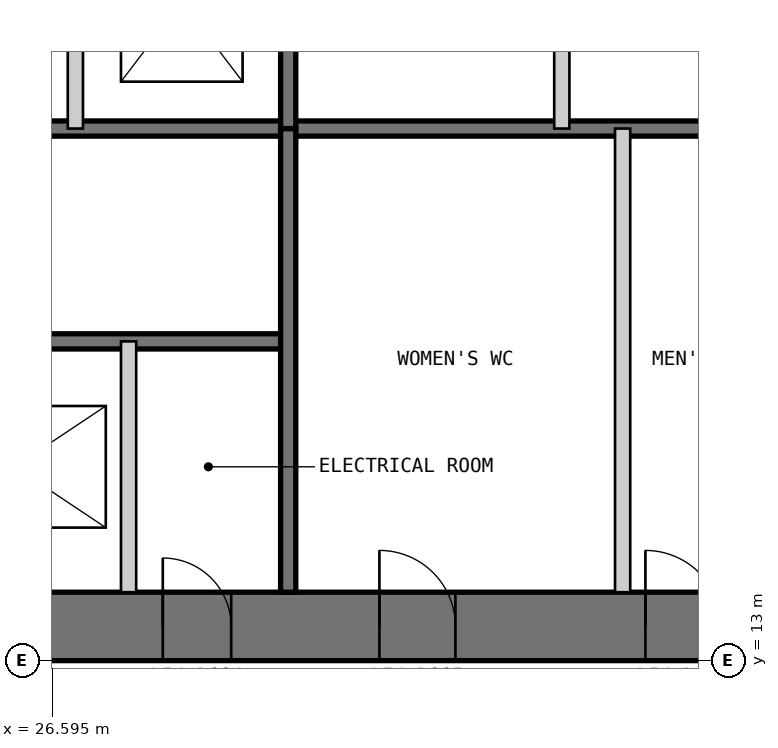
"""IFC4 building model, lengths in metres.
Left out: names, types, materials, properties, quantities, classifications, styles, units other than length and angle.
Written with IfcOpenShell. Run it as: python <this file> out.ifc"""

import sys

from ifc_helpers import new_model, si_unit, direction, frame, frame_2d, origin, place, context, subcontext, project, spatial, polyline, rectangle, outline, extrude, element, fill, save


model = new_model("IFC4")
c1 = context("Model", 3, precision=1e-05, world=origin(), true_north=direction((0.0, 1.0)))
c2 = subcontext(c1, "Body", "Model", "MODEL_VIEW")
j1 = project(units=[si_unit("LENGTHUNIT", "METRE"), si_unit("PLANEANGLEUNIT", "RADIAN")], contexts=[c1])
p1 = place(None, origin())
s1 = spatial("IfcSite", under=j1, at=p1, CompositionType="ELEMENT")
p2 = place(p1, origin())
s2 = spatial("IfcBuilding", under=s1, at=p2, CompositionType="ELEMENT")
p3 = place(p2, frame((0.0, 0.0, 229.8)))
s3 = spatial("IfcBuildingStorey", under=s2, at=p3, CompositionType="ELEMENT", Elevation=229.8)
p4 = place(p3, frame((13.0, 13.45, 0.0), z_axis=(0.0, 0.0, 1.0), x_axis=(1.0, 0.0, 0.0)))
e1 = element("IfcWall", 1, at=p4, inside=s3, PredefinedType="SHEAR", context=c2, shape_type="SweptSolid", body=[
    extrude(outline(polyline([(0.0, -0.45), (24.0, -0.45), (23.1, 0.45), (0.9, 0.45), (0.0, -0.45)])), origin(), (0.0, 0.0, 1.0), 4.0),
])
p5 = place(p4, frame((4.9, 0.0, 0.0)))
e2 = element("IfcOpeningElement", 2, at=p5, cuts=e1, PredefinedType="OPENING", context=c2, shape_type="SweptSolid", body=[
    extrude(rectangle(XDim=1.0, YDim=2.2, at=frame_2d((0.5, 1.1))), frame((0.0, 0.46, 0.0), z_axis=(0.0, -1.0, 0.0), x_axis=(1.0, 0.0, 0.0)), (0.0, 0.0, 1.0), 0.92),
])
p6 = place(p4, frame((8.9, 0.0, 0.0)))
e3 = element("IfcOpeningElement", 3, at=p6, cuts=e1, PredefinedType="OPENING", context=c2, shape_type="SweptSolid", body=[
    extrude(rectangle(XDim=1.1, YDim=2.2, at=frame_2d((0.55, 1.1))), frame((0.0, 0.46, 0.0), z_axis=(0.0, -1.0, 0.0), x_axis=(1.0, 0.0, 0.0)), (0.0, 0.0, 1.0), 0.92),
])
p7 = place(p4, frame((15.05, 0.0, 0.0)))
e4 = element("IfcOpeningElement", 4, at=p7, cuts=e1, PredefinedType="OPENING", context=c2, shape_type="SweptSolid", body=[
    extrude(rectangle(XDim=0.9, YDim=2.2, at=frame_2d((0.45, 1.1))), frame((0.0, 0.46, 0.0), z_axis=(0.0, -1.0, 0.0), x_axis=(1.0, 0.0, 0.0)), (0.0, 0.0, 1.0), 0.92),
])
p8 = place(p4, frame((17.9, 0.0, 0.0)))
e5 = element("IfcOpeningElement", 5, at=p8, cuts=e1, PredefinedType="OPENING", context=c2, shape_type="SweptSolid", body=[
    extrude(rectangle(XDim=1.0, YDim=2.2, at=frame_2d((0.5, 1.1))), frame((0.0, 0.46, 0.0), z_axis=(0.0, -1.0, 0.0), x_axis=(1.0, 0.0, 0.0)), (0.0, 0.0, 1.0), 0.92),
])
p9 = place(p4, frame((21.4, 0.0, 0.0)))
e6 = element("IfcOpeningElement", 6, at=p9, cuts=e1, PredefinedType="OPENING", context=c2, shape_type="SweptSolid", body=[
    extrude(rectangle(XDim=1.0, YDim=2.2, at=frame_2d((0.5, 1.1))), frame((0.0, 0.46, 0.0), z_axis=(0.0, -1.0, 0.0), x_axis=(1.0, 0.0, 0.0)), (0.0, 0.0, 1.0), 0.92),
])
p10 = place(p3, frame((20.3, 17.2, 0.0), z_axis=(0.0, 0.0, 1.0), x_axis=(1.0, 0.0, 0.0)))
e7 = element("IfcWall", 7, at=p10, inside=s3, PredefinedType="SOLIDWALL", context=c2, shape_type="SweptSolid", body=[
    extrude(rectangle(XDim=9.4, YDim=0.2, at=frame_2d((4.7, 0.0))), origin(), (0.0, 0.0, 1.0), 3.8),
])
p11 = place(p10, frame((0.25, 0.0, 0.0)))
e8 = element("IfcOpeningElement", 8, at=p11, cuts=e7, PredefinedType="OPENING", context=c2, shape_type="SweptSolid", body=[
    extrude(rectangle(XDim=1.0, YDim=2.2, at=frame_2d((0.5, 1.1))), frame((0.0, 0.11, 0.0), z_axis=(0.0, -1.0, 0.0), x_axis=(1.0, 0.0, 0.0)), (0.0, 0.0, 1.0), 0.22),
])
p12 = place(p3, frame((20.3, 20.0, 0.0), z_axis=(0.0, 0.0, 1.0), x_axis=(1.0, 0.0, 0.0)))
e9 = element("IfcWall", 9, at=p12, inside=s3, PredefinedType="SOLIDWALL", context=c2, shape_type="SweptSolid", body=[
    extrude(rectangle(XDim=15.8, YDim=0.2, at=frame_2d((7.9, 0.0))), origin(), (0.0, 0.0, 1.0), 3.8),
])
p13 = place(p3, frame((27.6, 13.9, 0.0), z_axis=(0.0, 0.0, 1.0), x_axis=(0.0, 1.0, 0.0)))
e10 = element("IfcWall", 10, at=p13, inside=s3, PredefinedType="PARTITIONING", context=c2, shape_type="SweptSolid", body=[
    extrude(rectangle(XDim=3.3, YDim=0.2, at=frame_2d((1.65, 0.0))), origin(), (0.0, 0.0, 1.0), 3.8),
])
p14 = place(p3, frame((29.7, 13.9, 0.0), z_axis=(0.0, 0.0, 1.0), x_axis=(0.0, 1.0, 0.0)))
e11 = element("IfcWall", 11, at=p14, inside=s3, PredefinedType="SOLIDWALL", context=c2, shape_type="SweptSolid", body=[
    extrude(rectangle(XDim=6.1, YDim=0.2, at=frame_2d((3.05, 0.0))), origin(), (0.0, 0.0, 1.0), 3.8),
])
p15 = place(p3, frame((34.1, 13.9, 0.0), z_axis=(0.0, 0.0, 1.0), x_axis=(0.0, 1.0, 0.0)))
e12 = element("IfcWall", 12, at=p15, inside=s3, PredefinedType="PARTITIONING", context=c2, shape_type="SweptSolid", body=[
    extrude(rectangle(XDim=6.1, YDim=0.2, at=frame_2d((3.05, 0.0))), origin(), (0.0, 0.0, 1.0), 3.8),
])
p16 = place(p3, frame((33.3, 36.1, 0.0), z_axis=(0.0, 0.0, 1.0), x_axis=(0.0, -1.0, 0.0)))
e13 = element("IfcWall", 13, at=p16, inside=s3, PredefinedType="PARTITIONING", context=c2, shape_type="SweptSolid", body=[
    extrude(rectangle(XDim=16.1, YDim=0.2, at=frame_2d((8.05, 0.0))), origin(), (0.0, 0.0, 1.0), 3.8),
])
p17 = place(p3, frame((29.7, 36.1, 0.0), z_axis=(0.0, 0.0, 1.0), x_axis=(0.0, -1.0, 0.0)))
e14 = element("IfcWall", 14, at=p17, inside=s3, PredefinedType="SOLIDWALL", context=c2, shape_type="SweptSolid", body=[
    extrude(rectangle(XDim=16.1, YDim=0.2, at=frame_2d((8.05, 0.0))), origin(), (0.0, 0.0, 1.0), 3.8),
])
p18 = place(p17, frame((7.217, 0.0, 0.0)))
e15 = element("IfcOpeningElement", 15, at=p18, cuts=e14, PredefinedType="OPENING", context=c2, shape_type="SweptSolid", body=[
    extrude(rectangle(XDim=1.1, YDim=2.2, at=frame_2d((0.55, 1.1))), frame((0.0, 0.11, 0.0), z_axis=(0.0, -1.0, 0.0), x_axis=(1.0, 0.0, 0.0)), (0.0, 0.0, 1.0), 0.22),
])
p19 = place(p17, frame((10.55, 0.0, 0.0)))
e16 = element("IfcOpeningElement", 16, at=p19, cuts=e14, PredefinedType="OPENING", context=c2, shape_type="SweptSolid", body=[
    extrude(rectangle(XDim=1.1, YDim=2.2, at=frame_2d((0.55, 1.1))), frame((0.0, 0.11, 0.0), z_axis=(0.0, -1.0, 0.0), x_axis=(1.0, 0.0, 0.0)), (0.0, 0.0, 1.0), 0.22),
])
p20 = place(p17, frame((13.883, 0.0, 0.0)))
e17 = element("IfcOpeningElement", 17, at=p20, cuts=e14, PredefinedType="OPENING", context=c2, shape_type="SweptSolid", body=[
    extrude(rectangle(XDim=1.1, YDim=2.2, at=frame_2d((0.55, 1.1))), frame((0.0, 0.11, 0.0), z_axis=(0.0, -1.0, 0.0), x_axis=(1.0, 0.0, 0.0)), (0.0, 0.0, 1.0), 0.22),
])
p21 = place(p3, frame((26.9, 30.0, 0.0), z_axis=(0.0, 0.0, 1.0), x_axis=(0.0, -1.0, 0.0)))
e18 = element("IfcWall", 18, at=p21, inside=s3, PredefinedType="PARTITIONING", context=c2, shape_type="SweptSolid", body=[
    extrude(rectangle(XDim=10.0, YDim=0.2, at=frame_2d((5.0, 0.0))), origin(), (0.0, 0.0, 1.0), 3.8),
])
p22 = place(p7, origin())
e19 = element("IfcDoor", 19, at=p22, inside=s3, OperationType="SINGLE_SWING_LEFT", PredefinedType="DOOR", context=c2, shape_type="SweptSolid", body=[
    extrude(rectangle(XDim=0.9, YDim=2.2, at=frame_2d((0.45, 1.1))), frame((0.0, 0.025, 0.0), z_axis=(0.0, -1.0, 0.0), x_axis=(1.0, 0.0, 0.0)), (0.0, 0.0, 1.0), 0.05),
    extrude(outline(polyline([(0.0, 0.0), (0.04, 0.0), (0.04, 2.16), (0.86, 2.16), (0.86, 0.0), (0.9, 0.0), (0.9, 2.2), (0.0, 2.2), (0.0, 0.0)])), frame((0.0, 0.3, 0.0), z_axis=(0.0, -1.0, 0.0), x_axis=(1.0, 0.0, 0.0)), (0.0, 0.0, 1.0), 0.6),
])
fill(e4, e19)
p23 = place(p8, origin())
e20 = element("IfcDoor", 20, at=p23, inside=s3, OperationType="SINGLE_SWING_LEFT", PredefinedType="DOOR", context=c2, shape_type="SweptSolid", body=[
    extrude(rectangle(XDim=1.0, YDim=2.2, at=frame_2d((0.5, 1.1))), frame((0.0, 0.025, 0.0), z_axis=(0.0, -1.0, 0.0), x_axis=(1.0, 0.0, 0.0)), (0.0, 0.0, 1.0), 0.05),
    extrude(outline(polyline([(0.0, 0.0), (0.04, 0.0), (0.04, 2.16), (0.96, 2.16), (0.96, 0.0), (1.0, 0.0), (1.0, 2.2), (0.0, 2.2), (0.0, 0.0)])), frame((0.0, 0.3, 0.0), z_axis=(0.0, -1.0, 0.0), x_axis=(1.0, 0.0, 0.0)), (0.0, 0.0, 1.0), 0.6),
])
fill(e5, e20)
p24 = place(p9, origin())
e21 = element("IfcDoor", 21, at=p24, inside=s3, OperationType="SINGLE_SWING_LEFT", PredefinedType="DOOR", context=c2, shape_type="SweptSolid", body=[
    extrude(rectangle(XDim=1.0, YDim=2.2, at=frame_2d((0.5, 1.1))), frame((0.0, 0.025, 0.0), z_axis=(0.0, -1.0, 0.0), x_axis=(1.0, 0.0, 0.0)), (0.0, 0.0, 1.0), 0.05),
    extrude(outline(polyline([(0.0, 0.0), (0.04, 0.0), (0.04, 2.16), (0.96, 2.16), (0.96, 0.0), (1.0, 0.0), (1.0, 2.2), (0.0, 2.2), (0.0, 0.0)])), frame((0.0, 0.3, 0.0), z_axis=(0.0, -1.0, 0.0), x_axis=(1.0, 0.0, 0.0)), (0.0, 0.0, 1.0), 0.6),
])
fill(e6, e21)
save(model, sys.argv[1])
